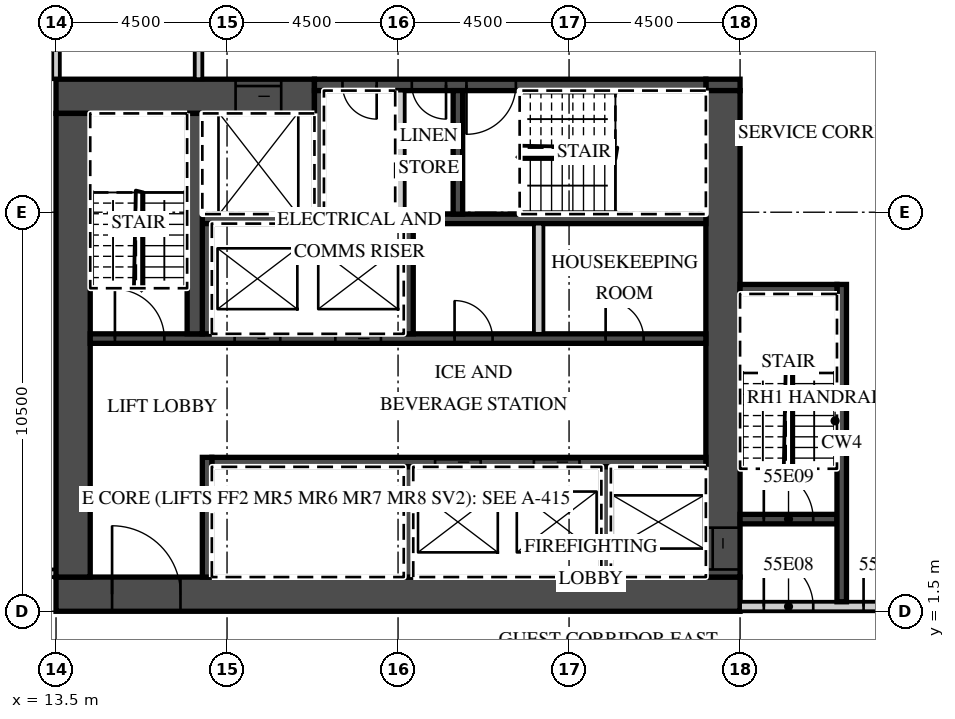
"""IFC4 building model, lengths in metres.
Left out: names, types, materials, properties, quantities, classifications, styles, units other than length and angle.
Written with IfcOpenShell. Run it as: python <this file> out.ifc"""

import sys

from ifc_helpers import new_model, si_unit, direction, frame, frame_2d, origin, place, context, subcontext, project, spatial, rectangle, extrude, element, fill, save


model = new_model("IFC4")
c1 = context("Model", 3, precision=1e-05, world=origin(), true_north=direction((0.0, 1.0)))
c2 = subcontext(c1, "Body", "Model", "MODEL_VIEW")
j1 = project(units=[si_unit("LENGTHUNIT", "METRE"), si_unit("PLANEANGLEUNIT", "RADIAN")], contexts=[c1])
p1 = place(None, origin())
s1 = spatial("IfcSite", under=j1, at=p1, CompositionType="ELEMENT")
p2 = place(p1, origin())
s2 = spatial("IfcBuilding", under=s1, at=p2, CompositionType="ELEMENT")
p3 = place(p2, frame((0.0, 0.0, 227.6)))
s3 = spatial("IfcBuildingStorey", under=s2, at=p3, CompositionType="ELEMENT", Elevation=227.6)
p4 = place(p3, frame((13.5, 15.5, 0.0), z_axis=(0.0, 0.0, 1.0), x_axis=(0.0, 1.0, 0.0)))
e1 = element("IfcWall", 1, at=p4, inside=s3, PredefinedType="PARTITIONING", context=c2, shape_type="SweptSolid", body=[
    extrude(rectangle(XDim=5.436, YDim=0.2, at=frame_2d((2.718, 0.0))), origin(), (0.0, 0.0, 1.0), 3.02),
])
p5 = place(p3, frame((-13.5, 2.5, 0.0), z_axis=(0.0, 0.0, 1.0), x_axis=(1.0, 0.0, 0.0)))
e2 = element("IfcWall", 2, at=p5, inside=s3, PredefinedType="PARTITIONING", context=c2, shape_type="SweptSolid", body=[
    extrude(rectangle(XDim=27.0, YDim=0.2, at=frame_2d((13.5, 0.0))), origin(), (0.0, 0.0, 1.0), 3.02),
])
p6 = place(p5, frame((2.925, 0.0, 0.0)))
e3 = element("IfcOpeningElement", 3, at=p6, cuts=e2, PredefinedType="OPENING", context=c2, shape_type="SweptSolid", body=[
    extrude(rectangle(XDim=1.0, YDim=2.1, at=frame_2d((0.5, 1.05))), frame((0.0, 0.11, 0.0), z_axis=(0.0, -1.0, 0.0), x_axis=(1.0, 0.0, 0.0)), (0.0, 0.0, 1.0), 0.22),
])
p7 = place(p5, frame((6.938, 0.0, 0.0)))
e4 = element("IfcOpeningElement", 4, at=p7, cuts=e2, PredefinedType="OPENING", context=c2, shape_type="SweptSolid", body=[
    extrude(rectangle(XDim=1.2, YDim=2.1, at=frame_2d((0.6, 1.05))), frame((0.0, 0.11, 0.0), z_axis=(0.0, -1.0, 0.0), x_axis=(1.0, 0.0, 0.0)), (0.0, 0.0, 1.0), 0.22),
])
p8 = place(p5, frame((14.075, 0.0, 0.0)))
e5 = element("IfcOpeningElement", 5, at=p8, cuts=e2, PredefinedType="OPENING", context=c2, shape_type="SweptSolid", body=[
    extrude(rectangle(XDim=1.0, YDim=2.1, at=frame_2d((0.5, 1.05))), frame((0.0, 0.11, 0.0), z_axis=(0.0, -1.0, 0.0), x_axis=(1.0, 0.0, 0.0)), (0.0, 0.0, 1.0), 0.22),
])
p9 = place(p5, frame((20.925, 0.0, 0.0)))
e6 = element("IfcOpeningElement", 6, at=p9, cuts=e2, PredefinedType="OPENING", context=c2, shape_type="SweptSolid", body=[
    extrude(rectangle(XDim=1.0, YDim=2.1, at=frame_2d((0.5, 1.05))), frame((0.0, 0.11, 0.0), z_axis=(0.0, -1.0, 0.0), x_axis=(1.0, 0.0, 0.0)), (0.0, 0.0, 1.0), 0.22),
])
p10 = place(p5, frame((25.425, 0.0, 0.0)))
e7 = element("IfcOpeningElement", 7, at=p10, cuts=e2, PredefinedType="OPENING", context=c2, shape_type="SweptSolid", body=[
    extrude(rectangle(XDim=1.0, YDim=2.1, at=frame_2d((0.5, 1.05))), frame((0.0, 0.11, 0.0), z_axis=(0.0, -1.0, 0.0), x_axis=(1.0, 0.0, 0.0)), (0.0, 0.0, 1.0), 0.22),
])
p11 = place(p3, frame((13.5, 1.95, 0.0), z_axis=(0.0, 0.0, 1.0), x_axis=(1.0, 0.0, 0.0)))
e8 = element("IfcWall", 8, at=p11, inside=s3, PredefinedType="SHEAR", context=c2, shape_type="SweptSolid", body=[
    extrude(rectangle(XDim=18.0, YDim=0.9, at=frame_2d((9.0, 0.0))), origin(), (0.0, 0.0, 1.0), 3.02),
])
p12 = place(p11, frame((1.475, 0.0, 0.0)))
e9 = element("IfcOpeningElement", 9, at=p12, cuts=e8, PredefinedType="OPENING", context=c2, shape_type="SweptSolid", body=[
    extrude(rectangle(XDim=1.8, YDim=2.1, at=frame_2d((0.9, 1.05))), frame((0.0, 0.46, 0.0), z_axis=(0.0, -1.0, 0.0), x_axis=(1.0, 0.0, 0.0)), (0.0, 0.0, 1.0), 0.92),
])
p13 = place(p3, frame((13.5, 15.05, 0.0), z_axis=(0.0, 0.0, 1.0), x_axis=(1.0, 0.0, 0.0)))
e10 = element("IfcWall", 10, at=p13, inside=s3, PredefinedType="SHEAR", context=c2, shape_type="SweptSolid", body=[
    extrude(rectangle(XDim=6.8, YDim=0.9, at=frame_2d((3.4, 0.0))), origin(), (0.0, 0.0, 1.0), 3.02),
])
p14 = place(p13, frame((4.725, 0.0, 0.0)))
e11 = element("IfcOpeningElement", 11, at=p14, cuts=e10, PredefinedType="OPENING", context=c2, shape_type="SweptSolid", body=[
    extrude(rectangle(XDim=1.2, YDim=2.1, at=frame_2d((0.6, 1.05))), frame((0.0, 0.46, 0.0), z_axis=(0.0, -1.0, 0.0), x_axis=(1.0, 0.0, 0.0)), (0.0, 0.0, 1.0), 0.92),
])
p15 = place(p3, frame((30.6, 15.35, 0.0), z_axis=(0.0, 0.0, 1.0), x_axis=(1.0, 0.0, 0.0)))
e12 = element("IfcWall", 12, at=p15, inside=s3, PredefinedType="SHEAR", context=c2, shape_type="SweptSolid", body=[
    extrude(rectangle(XDim=0.9, YDim=0.3, at=frame_2d((0.45, 0.0))), origin(), (0.0, 0.0, 1.0), 3.02),
])
p16 = place(p3, frame((20.3, 15.35, 0.0), z_axis=(0.0, 0.0, 1.0), x_axis=(1.0, 0.0, 0.0)))
e13 = element("IfcWall", 13, at=p16, inside=s3, PredefinedType="SHEAR", context=c2, shape_type="SweptSolid", body=[
    extrude(rectangle(XDim=10.3, YDim=0.3, at=frame_2d((5.15, 0.0))), origin(), (0.0, 0.0, 1.0), 3.02),
])
p17 = place(p16, frame((4.0, 0.0, 0.0)))
e14 = element("IfcOpeningElement", 14, at=p17, cuts=e13, PredefinedType="OPENING", context=c2, shape_type="SweptSolid", body=[
    extrude(rectangle(XDim=1.3, YDim=2.1, at=frame_2d((0.65, 1.05))), frame((0.0, 0.16, 0.0), z_axis=(0.0, -1.0, 0.0), x_axis=(1.0, 0.0, 0.0)), (0.0, 0.0, 1.0), 0.32),
])
p18 = place(p16, frame((2.562, 0.0, 0.0)))
e15 = element("IfcOpeningElement", 15, at=p18, cuts=e13, PredefinedType="OPENING", context=c2, shape_type="SweptSolid", body=[
    extrude(rectangle(XDim=0.9, YDim=2.1, at=frame_2d((0.45, 1.05))), frame((0.0, 0.16, 0.0), z_axis=(0.0, -1.0, 0.0), x_axis=(1.0, 0.0, 0.0)), (0.0, 0.0, 1.0), 0.32),
])
p19 = place(p16, frame((0.738, 0.0, 0.0)))
e16 = element("IfcOpeningElement", 16, at=p19, cuts=e13, PredefinedType="OPENING", context=c2, shape_type="SweptSolid", body=[
    extrude(rectangle(XDim=0.9, YDim=2.1, at=frame_2d((0.45, 1.05))), frame((0.0, 0.16, 0.0), z_axis=(0.0, -1.0, 0.0), x_axis=(1.0, 0.0, 0.0)), (0.0, 0.0, 1.0), 0.32),
])
p20 = place(p3, frame((31.05, 2.4, 0.0), z_axis=(0.0, 0.0, 1.0), x_axis=(0.0, 1.0, 0.0)))
e17 = element("IfcWall", 17, at=p20, inside=s3, PredefinedType="SHEAR", context=c2, shape_type="SweptSolid", body=[
    extrude(rectangle(XDim=12.8, YDim=0.9, at=frame_2d((6.4, 0.0))), origin(), (0.0, 0.0, 1.0), 3.02),
])
p21 = place(p20, frame((0.2, 0.0, 0.0)))
e18 = element("IfcOpeningElement", 18, at=p21, cuts=e17, PredefinedType="OPENING", context=c2, shape_type="SweptSolid", body=[
    extrude(rectangle(XDim=1.1, YDim=2.1, at=frame_2d((0.55, 1.05))), frame((0.0, 0.46, 0.0), z_axis=(0.0, -1.0, 0.0), x_axis=(1.0, 0.0, 0.0)), (0.0, 0.0, 1.0), 0.92),
])
p22 = place(p3, frame((13.95, 2.4, 0.0), z_axis=(0.0, 0.0, 1.0), x_axis=(0.0, 1.0, 0.0)))
e19 = element("IfcWall", 19, at=p22, inside=s3, PredefinedType="SHEAR", context=c2, shape_type="SweptSolid", body=[
    extrude(rectangle(XDim=12.2, YDim=0.9, at=frame_2d((6.1, 0.0))), origin(), (0.0, 0.0, 1.0), 3.02),
])
p23 = place(p3, frame((17.6, 5.425, 0.0), z_axis=(0.0, 0.0, 1.0), x_axis=(1.0, 0.0, 0.0)))
e20 = element("IfcWall", 20, at=p23, inside=s3, PredefinedType="SHEAR", context=c2, shape_type="SweptSolid", body=[
    extrude(rectangle(XDim=13.0, YDim=0.25, at=frame_2d((6.5, 0.0))), origin(), (0.0, 0.0, 1.0), 3.02),
])
p24 = place(p23, frame((8.475, 0.0, 0.0)))
e21 = element("IfcOpeningElement", 21, at=p24, cuts=e20, PredefinedType="OPENING", context=c2, shape_type="SweptSolid", body=[
    extrude(rectangle(XDim=1.2, YDim=2.1, at=frame_2d((0.6, 1.05))), frame((0.0, 0.135, 0.0), z_axis=(0.0, -1.0, 0.0), x_axis=(1.0, 0.0, 0.0)), (0.0, 0.0, 1.0), 0.27),
])
p25 = place(p23, frame((5.875, 0.0, 0.0)))
e22 = element("IfcOpeningElement", 22, at=p25, cuts=e20, PredefinedType="OPENING", context=c2, shape_type="SweptSolid", body=[
    extrude(rectangle(XDim=1.2, YDim=2.1, at=frame_2d((0.6, 1.05))), frame((0.0, 0.135, 0.0), z_axis=(0.0, -1.0, 0.0), x_axis=(1.0, 0.0, 0.0)), (0.0, 0.0, 1.0), 0.27),
])
p26 = place(p3, frame((17.475, 2.4, 0.0), z_axis=(0.0, 0.0, 1.0), x_axis=(0.0, 1.0, 0.0)))
e23 = element("IfcWall", 23, at=p26, inside=s3, PredefinedType="SHEAR", context=c2, shape_type="SweptSolid", body=[
    extrude(rectangle(XDim=3.15, YDim=0.25, at=frame_2d((1.575, 0.0))), origin(), (0.0, 0.0, 1.0), 3.02),
])
for number, where, z_axis, x_axis in (
    (24, (27.975, 2.4, 0.0), (0.0, 0.0, 1.0), (0.0, 1.0, 0.0)),
    (25, (22.775, 2.4, 0.0), (0.0, 0.0, 1.0), (0.0, 1.0, 0.0)),
):
    element("IfcWall", number, at=place(p3, frame(where, z_axis=z_axis, x_axis=x_axis)), inside=s3, PredefinedType="SHEAR", context=c2, shape_type="SweptSolid", body=[
        extrude(rectangle(XDim=2.9, YDim=0.25, at=frame_2d((1.45, 0.0))), origin(), (0.0, 0.0, 1.0), 3.02),
    ])
p27 = place(p3, frame((14.4, 8.675, 0.0), z_axis=(0.0, 0.0, 1.0), x_axis=(1.0, 0.0, 0.0)))
e26 = element("IfcWall", 26, at=p27, inside=s3, PredefinedType="SHEAR", context=c2, shape_type="SweptSolid", body=[
    extrude(rectangle(XDim=16.2, YDim=0.25, at=frame_2d((8.1, 0.0))), origin(), (0.0, 0.0, 1.0), 3.02),
])
p28 = place(p27, frame((6.45, 0.0, 0.0)))
e27 = element("IfcOpeningElement", 27, at=p28, cuts=e26, PredefinedType="OPENING", context=c2, shape_type="SweptSolid", body=[
    extrude(rectangle(XDim=1.2, YDim=2.1, at=frame_2d((0.6, 1.05))), frame((0.0, 0.135, 0.0), z_axis=(0.0, -1.0, 0.0), x_axis=(1.0, 0.0, 0.0)), (0.0, 0.0, 1.0), 0.27),
])
p29 = place(p27, frame((3.8, 0.0, 0.0)))
e28 = element("IfcOpeningElement", 28, at=p29, cuts=e26, PredefinedType="OPENING", context=c2, shape_type="SweptSolid", body=[
    extrude(rectangle(XDim=1.2, YDim=2.1, at=frame_2d((0.6, 1.05))), frame((0.0, 0.135, 0.0), z_axis=(0.0, -1.0, 0.0), x_axis=(1.0, 0.0, 0.0)), (0.0, 0.0, 1.0), 0.27),
])
p30 = place(p27, frame((0.65, 0.0, 0.0)))
e29 = element("IfcOpeningElement", 29, at=p30, cuts=e26, PredefinedType="OPENING", context=c2, shape_type="SweptSolid", body=[
    extrude(rectangle(XDim=1.3, YDim=2.1, at=frame_2d((0.65, 1.05))), frame((0.0, 0.135, 0.0), z_axis=(0.0, -1.0, 0.0), x_axis=(1.0, 0.0, 0.0)), (0.0, 0.0, 1.0), 0.27),
])
p31 = place(p27, frame((13.562, 0.0, 0.0)))
e30 = element("IfcOpeningElement", 30, at=p31, cuts=e26, PredefinedType="OPENING", context=c2, shape_type="SweptSolid", body=[
    extrude(rectangle(XDim=1.0, YDim=2.1, at=frame_2d((0.5, 1.05))), frame((0.0, 0.135, 0.0), z_axis=(0.0, -1.0, 0.0), x_axis=(1.0, 0.0, 0.0)), (0.0, 0.0, 1.0), 0.27),
])
p32 = place(p27, frame((9.587, 0.0, 0.0)))
e31 = element("IfcOpeningElement", 31, at=p32, cuts=e26, PredefinedType="OPENING", context=c2, shape_type="SweptSolid", body=[
    extrude(rectangle(XDim=1.0, YDim=2.1, at=frame_2d((0.5, 1.05))), frame((0.0, 0.135, 0.0), z_axis=(0.0, -1.0, 0.0), x_axis=(1.0, 0.0, 0.0)), (0.0, 0.0, 1.0), 0.27),
])
p33 = place(p3, frame((17.35, 11.825, 0.0), z_axis=(0.0, 0.0, 1.0), x_axis=(1.0, 0.0, 0.0)))
e32 = element("IfcWall", 32, at=p33, inside=s3, PredefinedType="SHEAR", context=c2, shape_type="SweptSolid", body=[
    extrude(rectangle(XDim=13.25, YDim=0.25, at=frame_2d((6.625, 0.0))), origin(), (0.0, 0.0, 1.0), 3.02),
])
for number, where, z_axis, x_axis in (
    (33, (17.475, 8.8, 0.0), (0.0, 0.0, 1.0), (0.0, 1.0, 0.0)),
    (34, (22.775, 8.8, 0.0), (0.0, 0.0, 1.0), (0.0, 1.0, 0.0)),
):
    element("IfcWall", number, at=place(p3, frame(where, z_axis=z_axis, x_axis=x_axis)), inside=s3, PredefinedType="SHEAR", context=c2, shape_type="SweptSolid", body=[
        extrude(rectangle(XDim=2.9, YDim=0.25, at=frame_2d((1.45, 0.0))), origin(), (0.0, 0.0, 1.0), 3.02),
    ])
p34 = place(p3, frame((26.2, 8.8, 0.0), z_axis=(0.0, 0.0, 1.0), x_axis=(0.0, 1.0, 0.0)))
e35 = element("IfcWall", 35, at=p34, inside=s3, PredefinedType="PARTITIONING", context=c2, shape_type="SweptSolid", body=[
    extrude(rectangle(XDim=2.9, YDim=0.25, at=frame_2d((1.45, 0.0))), origin(), (0.0, 0.0, 1.0), 3.02),
])
p35 = place(p3, frame((17.15, 8.8, 0.0), z_axis=(0.0, 0.0, 1.0), x_axis=(0.0, 1.0, 0.0)))
e36 = element("IfcWall", 36, at=p35, inside=s3, PredefinedType="SHEAR", context=c2, shape_type="SweptSolid", body=[
    extrude(rectangle(XDim=5.8, YDim=0.4, at=frame_2d((2.9, 0.0))), origin(), (0.0, 0.0, 1.0), 3.02),
])
for number, where, z_axis, x_axis in (
    (37, (20.425, 11.95, 0.0), (0.0, 0.0, 1.0), (0.0, 1.0, 0.0)),
    (38, (24.075, 11.95, 0.0), (0.0, 0.0, 1.0), (0.0, 1.0, 0.0)),
):
    element("IfcWall", number, at=place(p3, frame(where, z_axis=z_axis, x_axis=x_axis)), inside=s3, PredefinedType="SHEAR", context=c2, shape_type="SweptSolid", body=[
        extrude(rectangle(XDim=3.25, YDim=0.25, at=frame_2d((1.625, 0.0))), origin(), (0.0, 0.0, 1.0), 3.02),
    ])
p36 = place(p3, frame((22.55, 11.95, 0.0), z_axis=(0.0, 0.0, 1.0), x_axis=(0.0, 1.0, 0.0)))
e39 = element("IfcWall", 39, at=p36, inside=s3, PredefinedType="PARTITIONING", context=c2, shape_type="SweptSolid", body=[
    extrude(rectangle(XDim=3.25, YDim=0.25, at=frame_2d((1.625, 0.0))), origin(), (0.0, 0.0, 1.0), 3.02),
])
p37 = place(p3, frame((31.5, 1.625, 0.0), z_axis=(0.0, 0.0, 1.0), x_axis=(1.0, 0.0, 0.0)))
e40 = element("IfcWall", 40, at=p37, inside=s3, PredefinedType="PARTITIONING", context=c2, shape_type="SweptSolid", body=[
    extrude(rectangle(XDim=11.04, YDim=0.25, at=frame_2d((5.52, 0.0))), origin(), (0.0, 0.0, 1.0), 3.02),
])
p38 = place(p37, frame((0.625, 0.0, 0.0)))
e41 = element("IfcOpeningElement", 41, at=p38, cuts=e40, PredefinedType="OPENING", context=c2, shape_type="SweptSolid", body=[
    extrude(rectangle(XDim=1.3, YDim=2.1, at=frame_2d((0.65, 1.05))), frame((0.0, 0.135, 0.0), z_axis=(0.0, -1.0, 0.0), x_axis=(1.0, 0.0, 0.0)), (0.0, 0.0, 1.0), 0.27),
])
p39 = place(p37, frame((3.25, 0.0, 0.0)))
e42 = element("IfcOpeningElement", 42, at=p39, cuts=e40, PredefinedType="OPENING", context=c2, shape_type="SweptSolid", body=[
    extrude(rectangle(XDim=1.1, YDim=2.1, at=frame_2d((0.55, 1.05))), frame((0.0, 0.135, 0.0), z_axis=(0.0, -1.0, 0.0), x_axis=(1.0, 0.0, 0.0)), (0.0, 0.0, 1.0), 0.27),
])
p40 = place(p3, frame((31.5, 3.925, 0.0), z_axis=(0.0, 0.0, 1.0), x_axis=(1.0, 0.0, 0.0)))
e43 = element("IfcWall", 43, at=p40, inside=s3, PredefinedType="SHEAR", context=c2, shape_type="SweptSolid", body=[
    extrude(rectangle(XDim=2.55, YDim=0.25, at=frame_2d((1.275, 0.0))), origin(), (0.0, 0.0, 1.0), 3.02),
])
p41 = place(p40, frame((0.625, 0.0, 0.0)))
e44 = element("IfcOpeningElement", 44, at=p41, cuts=e43, PredefinedType="OPENING", context=c2, shape_type="SweptSolid", body=[
    extrude(rectangle(XDim=1.3, YDim=2.1, at=frame_2d((0.65, 1.05))), frame((0.0, 0.135, 0.0), z_axis=(0.0, -1.0, 0.0), x_axis=(1.0, 0.0, 0.0)), (0.0, 0.0, 1.0), 0.27),
])
p42 = place(p3, frame((34.175, 1.75, 0.0), z_axis=(0.0, 0.0, 1.0), x_axis=(0.0, 1.0, 0.0)))
e45 = element("IfcWall", 45, at=p42, inside=s3, PredefinedType="SHEAR", context=c2, shape_type="SweptSolid", body=[
    extrude(rectangle(XDim=8.35, YDim=0.25, at=frame_2d((4.175, 0.0))), origin(), (0.0, 0.0, 1.0), 3.02),
])
p43 = place(p3, frame((31.5, 9.975, 0.0), z_axis=(0.0, 0.0, 1.0), x_axis=(1.0, 0.0, 0.0)))
e46 = element("IfcWall", 46, at=p43, inside=s3, PredefinedType="SHEAR", context=c2, shape_type="SweptSolid", body=[
    extrude(rectangle(XDim=2.55, YDim=0.25, at=frame_2d((1.275, 0.0))), origin(), (0.0, 0.0, 1.0), 3.02),
])
p44 = place(p3, frame((17.25, 15.5, 0.0), z_axis=(0.0, 0.0, 1.0), x_axis=(0.0, 1.0, 0.0)))
e47 = element("IfcWall", 47, at=p44, inside=s3, PredefinedType="PARTITIONING", context=c2, shape_type="SweptSolid", body=[
    extrude(rectangle(XDim=2.2, YDim=0.2, at=frame_2d((1.1, 0.0))), origin(), (0.0, 0.0, 1.0), 3.02),
])
p45 = place(p28, origin())
e48 = element("IfcDoor", 48, at=p45, inside=s3, OperationType="SLIDING_TO_LEFT", PredefinedType="DOOR", context=c2, shape_type="SweptSolid", body=[
    extrude(rectangle(XDim=1.2, YDim=2.1, at=frame_2d((0.6, 1.05))), frame((0.0, 0.025, 0.0), z_axis=(0.0, -1.0, 0.0), x_axis=(1.0, 0.0, 0.0)), (0.0, 0.0, 1.0), 0.05),
])
fill(e27, e48)
p46 = place(p29, origin())
e49 = element("IfcDoor", 49, at=p46, inside=s3, OperationType="SLIDING_TO_RIGHT", PredefinedType="DOOR", context=c2, shape_type="SweptSolid", body=[
    extrude(rectangle(XDim=1.2, YDim=2.1, at=frame_2d((0.6, 1.05))), frame((0.0, 0.025, 0.0), z_axis=(0.0, -1.0, 0.0), x_axis=(1.0, 0.0, 0.0)), (0.0, 0.0, 1.0), 0.05),
])
fill(e28, e49)
p47 = place(p24, origin())
e50 = element("IfcDoor", 50, at=p47, inside=s3, OperationType="SLIDING_TO_LEFT", PredefinedType="DOOR", context=c2, shape_type="SweptSolid", body=[
    extrude(rectangle(XDim=1.2, YDim=2.1, at=frame_2d((0.6, 1.05))), frame((0.0, 0.025, 0.0), z_axis=(0.0, -1.0, 0.0), x_axis=(1.0, 0.0, 0.0)), (0.0, 0.0, 1.0), 0.05),
])
fill(e21, e50)
p48 = place(p25, origin())
e51 = element("IfcDoor", 51, at=p48, inside=s3, OperationType="SLIDING_TO_RIGHT", PredefinedType="DOOR", context=c2, shape_type="SweptSolid", body=[
    extrude(rectangle(XDim=1.2, YDim=2.1, at=frame_2d((0.6, 1.05))), frame((0.0, 0.025, 0.0), z_axis=(0.0, -1.0, 0.0), x_axis=(1.0, 0.0, 0.0)), (0.0, 0.0, 1.0), 0.05),
])
fill(e22, e51)
p49 = place(p14, origin())
e52 = element("IfcDoor", 52, at=p49, inside=s3, OperationType="SLIDING_TO_LEFT", PredefinedType="DOOR", context=c2, shape_type="SweptSolid", body=[
    extrude(rectangle(XDim=1.2, YDim=2.1, at=frame_2d((0.6, 1.05))), frame((0.0, 0.025, 0.0), z_axis=(0.0, -1.0, 0.0), x_axis=(1.0, 0.0, 0.0)), (0.0, 0.0, 1.0), 0.05),
])
fill(e11, e52)
p50 = place(p21, origin())
e53 = element("IfcDoor", 53, at=p50, inside=s3, OperationType="SLIDING_TO_LEFT", PredefinedType="DOOR", context=c2, shape_type="SweptSolid", body=[
    extrude(rectangle(XDim=1.1, YDim=2.1, at=frame_2d((0.55, 1.05))), frame((0.0, 0.025, 0.0), z_axis=(0.0, -1.0, 0.0), x_axis=(1.0, 0.0, 0.0)), (0.0, 0.0, 1.0), 0.05),
])
fill(e18, e53)
p51 = place(p12, origin())
e54 = element("IfcDoor", 54, at=p51, inside=s3, OperationType="DOUBLE_DOOR_DOUBLE_SWING", PredefinedType="DOOR", context=c2, shape_type="SweptSolid", body=[
    extrude(rectangle(XDim=1.8, YDim=2.1, at=frame_2d((0.9, 1.05))), frame((0.0, 0.025, 0.0), z_axis=(0.0, -1.0, 0.0), x_axis=(1.0, 0.0, 0.0)), (0.0, 0.0, 1.0), 0.05),
])
fill(e9, e54)
p52 = place(p38, origin())
e55 = element("IfcDoor", 55, at=p52, inside=s3, OperationType="SINGLE_SWING_LEFT", PredefinedType="DOOR", context=c2, shape_type="SweptSolid", body=[
    extrude(rectangle(XDim=1.3, YDim=2.1, at=frame_2d((0.65, 1.05))), frame((0.0, 0.025, 0.0), z_axis=(0.0, -1.0, 0.0), x_axis=(1.0, 0.0, 0.0)), (0.0, 0.0, 1.0), 0.05),
])
fill(e41, e55)
p53 = place(p41, origin())
e56 = element("IfcDoor", 56, at=p53, inside=s3, OperationType="SINGLE_SWING_LEFT", PredefinedType="DOOR", context=c2, shape_type="SweptSolid", body=[
    extrude(rectangle(XDim=1.3, YDim=2.1, at=frame_2d((0.65, 1.05))), frame((0.0, 0.025, 0.0), z_axis=(0.0, -1.0, 0.0), x_axis=(1.0, 0.0, 0.0)), (0.0, 0.0, 1.0), 0.05),
])
fill(e44, e56)
p54 = place(p39, origin())
e57 = element("IfcDoor", 57, at=p54, inside=s3, OperationType="SINGLE_SWING_LEFT", PredefinedType="DOOR", context=c2, shape_type="SweptSolid", body=[
    extrude(rectangle(XDim=1.1, YDim=2.1, at=frame_2d((0.55, 1.05))), frame((0.0, 0.025, 0.0), z_axis=(0.0, -1.0, 0.0), x_axis=(1.0, 0.0, 0.0)), (0.0, 0.0, 1.0), 0.05),
])
fill(e42, e57)
p55 = place(p30, origin())
e58 = element("IfcDoor", 58, at=p55, inside=s3, OperationType="SINGLE_SWING_LEFT", PredefinedType="DOOR", context=c2, shape_type="SweptSolid", body=[
    extrude(rectangle(XDim=1.3, YDim=2.1, at=frame_2d((0.65, 1.05))), frame((0.0, 0.025, 0.0), z_axis=(0.0, -1.0, 0.0), x_axis=(1.0, 0.0, 0.0)), (0.0, 0.0, 1.0), 0.05),
])
fill(e29, e58)
p56 = place(p17, origin())
e59 = element("IfcDoor", 59, at=p56, inside=s3, OperationType="SINGLE_SWING_LEFT", PredefinedType="DOOR", context=c2, shape_type="SweptSolid", body=[
    extrude(rectangle(XDim=1.3, YDim=2.1, at=frame_2d((0.65, 1.05))), frame((0.0, 0.025, 0.0), z_axis=(0.0, -1.0, 0.0), x_axis=(1.0, 0.0, 0.0)), (0.0, 0.0, 1.0), 0.05),
])
fill(e14, e59)
p57 = place(p18, origin())
e60 = element("IfcDoor", 60, at=p57, inside=s3, OperationType="SINGLE_SWING_RIGHT", PredefinedType="DOOR", context=c2, shape_type="SweptSolid", body=[
    extrude(rectangle(XDim=0.9, YDim=2.1, at=frame_2d((0.45, 1.05))), frame((0.0, 0.025, 0.0), z_axis=(0.0, -1.0, 0.0), x_axis=(1.0, 0.0, 0.0)), (0.0, 0.0, 1.0), 0.05),
])
fill(e15, e60)
p58 = place(p19, origin())
e61 = element("IfcDoor", 61, at=p58, inside=s3, OperationType="SINGLE_SWING_RIGHT", PredefinedType="DOOR", context=c2, shape_type="SweptSolid", body=[
    extrude(rectangle(XDim=0.9, YDim=2.1, at=frame_2d((0.45, 1.05))), frame((0.0, 0.025, 0.0), z_axis=(0.0, -1.0, 0.0), x_axis=(1.0, 0.0, 0.0)), (0.0, 0.0, 1.0), 0.05),
])
fill(e16, e61)
p59 = place(p31, origin())
e62 = element("IfcDoor", 62, at=p59, inside=s3, OperationType="SINGLE_SWING_LEFT", PredefinedType="DOOR", context=c2, shape_type="SweptSolid", body=[
    extrude(rectangle(XDim=1.0, YDim=2.1, at=frame_2d((0.5, 1.05))), frame((0.0, 0.025, 0.0), z_axis=(0.0, -1.0, 0.0), x_axis=(1.0, 0.0, 0.0)), (0.0, 0.0, 1.0), 0.05),
])
fill(e30, e62)
p60 = place(p32, origin())
e63 = element("IfcDoor", 63, at=p60, inside=s3, OperationType="SINGLE_SWING_LEFT", PredefinedType="DOOR", context=c2, shape_type="SweptSolid", body=[
    extrude(rectangle(XDim=1.0, YDim=2.1, at=frame_2d((0.5, 1.05))), frame((0.0, 0.025, 0.0), z_axis=(0.0, -1.0, 0.0), x_axis=(1.0, 0.0, 0.0)), (0.0, 0.0, 1.0), 0.05),
])
fill(e31, e63)
save(model, sys.argv[1])
